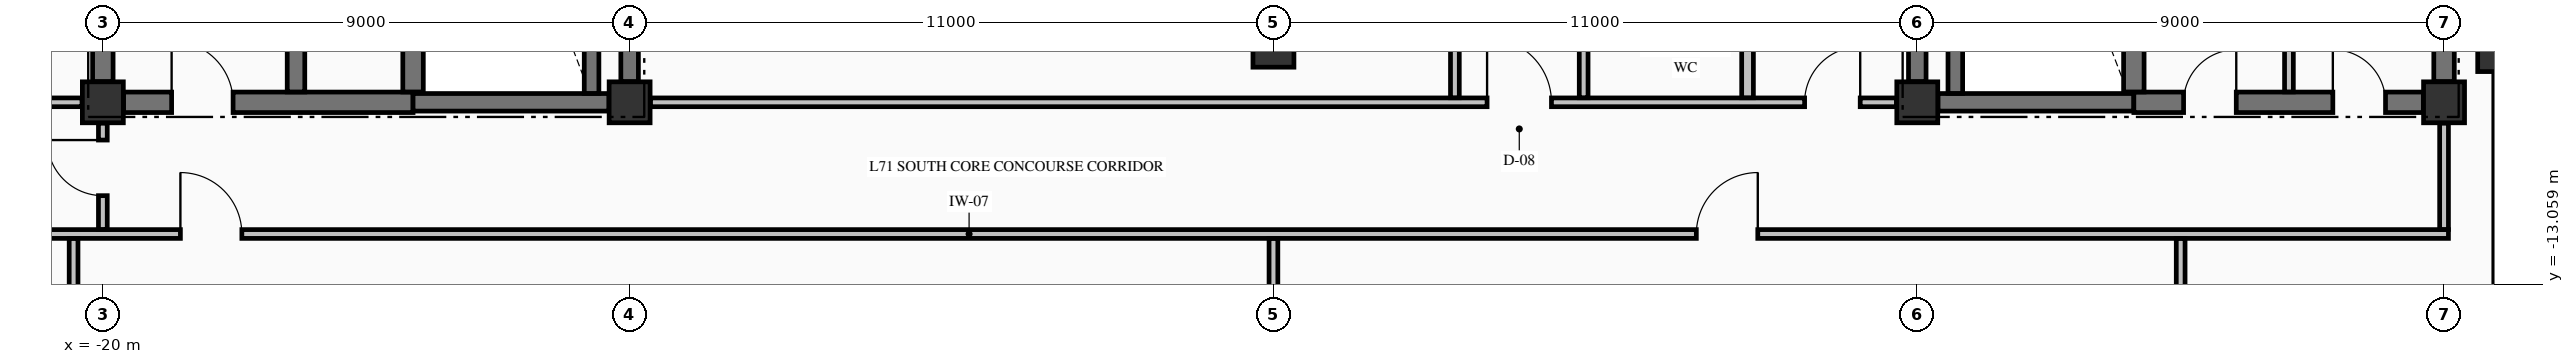
"""IFC4 building model, lengths in metres.
Left out: names, types, materials, properties, quantities, classifications, styles, units other than length and angle.
Written with IfcOpenShell. Run it as: python <this file> out.ifc"""

import sys

from ifc_helpers import new_model, si_unit, direction, frame, frame_2d, origin, origin_2d, place, context, subcontext, project, spatial, rectangle, extrude, element, fill, save


model = new_model("IFC4")
c1 = context("Model", 3, precision=1e-05, world=origin(), true_north=direction((0.0, 1.0)))
c2 = subcontext(c1, "Body", "Model", "MODEL_VIEW")
j1 = project(units=[si_unit("LENGTHUNIT", "METRE"), si_unit("PLANEANGLEUNIT", "RADIAN")], contexts=[c1])
p1 = place(None, origin())
s1 = spatial("IfcSite", under=j1, at=p1, CompositionType="ELEMENT")
p2 = place(p1, origin())
s2 = spatial("IfcBuilding", under=s1, at=p2, CompositionType="ELEMENT")
p3 = place(p2, frame((0.0, 0.0, 267.35)))
s3 = spatial("IfcBuildingStorey", under=s2, at=p3, CompositionType="ELEMENT", Elevation=267.35)
p4 = place(p3, frame((21.0, -9.0, -0.25), z_axis=(0.0, 0.0, 1.0), x_axis=(1.0, 0.0, 0.0)))
e1 = element("IfcColumn", 1, at=p4, inside=s3, PredefinedType="COLUMN", context=c2, shape_type="SweptSolid", body=[
    extrude(rectangle(XDim=0.85, YDim=0.85, at=origin_2d()), origin(), (0.0, 0.0, 1.0), 3.155),
])
for number, where, z_axis, x_axis in (
    (2, (-20.0, -9.95, -0.25), (0.0, 0.0, 1.0), (1.0, 0.0, 0.0)),
    (3, (-11.0, -9.95, -0.25), (0.0, 0.0, 1.0), (1.0, 0.0, 0.0)),
    (4, (11.0, -9.95, -0.25), (0.0, 0.0, 1.0), (1.0, 0.0, 0.0)),
    (5, (20.0, -9.95, -0.25), (0.0, 0.0, 1.0), (1.0, 0.0, 0.0)),
    (6, (0.0, -9.0, -0.25), (0.0, 0.0, 1.0), (1.0, 0.0, 0.0)),
):
    element("IfcColumn", number, at=place(p3, frame(where, z_axis=z_axis, x_axis=x_axis)), inside=s3, PredefinedType="COLUMN", context=c2, shape_type="SweptSolid", body=[
        extrude(rectangle(XDim=0.7, YDim=0.7, at=origin_2d()), origin(), (0.0, 0.0, 1.0), 3.155),
    ])
p5 = place(p3, frame((21.0, -17.545, 0.0), z_axis=(0.0, 0.0, 1.0), x_axis=(0.0, 1.0, 0.0)))
e7 = element("IfcWall", 7, at=p5, inside=s3, PredefinedType="STANDARD", context=c2, shape_type="SweptSolid", body=[
    extrude(rectangle(XDim=8.09, YDim=0.3, at=frame_2d((4.045, 0.0))), origin(), (0.0, 0.0, 1.0), 2.297),
])
p6 = place(p3, frame((-19.646, -9.95, 0.0), z_axis=(0.0, 0.0, 1.0), x_axis=(1.0, 0.0, 0.0)))
e8 = element("IfcWall", 8, at=p6, inside=s3, PredefinedType="SHEAR", context=c2, shape_type="SweptSolid", body=[
    extrude(rectangle(XDim=4.946, YDim=0.35, at=frame_2d((2.473, 0.0))), origin(), (0.0, 0.0, 1.0), 2.905),
])
p7 = place(p6, frame((0.821, 0.0, 0.0)))
e9 = element("IfcOpeningElement", 9, at=p7, cuts=e8, PredefinedType="OPENING", context=c2, shape_type="SweptSolid", body=[
    extrude(rectangle(XDim=1.05, YDim=2.15, at=frame_2d((0.525, 1.075))), frame((0.0, 0.185, 0.0), z_axis=(0.0, -1.0, 0.0), x_axis=(1.0, 0.0, 0.0)), (0.0, 0.0, 1.0), 0.37),
])
for number, where, z_axis, x_axis in (
    (10, (-14.7, -9.95, 0.0), (0.0, 0.0, 1.0), (1.0, 0.0, 0.0)),
    (11, (11.354, -9.95, 0.0), (0.0, 0.0, 1.0), (1.0, 0.0, 0.0)),
):
    element("IfcWall", number, at=place(p3, frame(where, z_axis=z_axis, x_axis=x_axis)), inside=s3, PredefinedType="SHEAR", context=c2, shape_type="SweptSolid", body=[
        extrude(rectangle(XDim=3.346, YDim=0.3, at=frame_2d((1.673, 0.0))), origin(), (0.0, 0.0, 1.0), 2.905),
    ])
p8 = place(p3, frame((14.7, -9.95, 0.0), z_axis=(0.0, 0.0, 1.0), x_axis=(1.0, 0.0, 0.0)))
e12 = element("IfcWall", 12, at=p8, inside=s3, PredefinedType="SHEAR", context=c2, shape_type="SweptSolid", body=[
    extrude(rectangle(XDim=4.946, YDim=0.35, at=frame_2d((2.473, 0.0))), origin(), (0.0, 0.0, 1.0), 2.905),
])
p9 = place(p8, frame((0.85, 0.0, 0.0)))
e13 = element("IfcOpeningElement", 13, at=p9, cuts=e12, PredefinedType="OPENING", context=c2, shape_type="SweptSolid", body=[
    extrude(rectangle(XDim=0.9, YDim=2.15, at=frame_2d((0.45, 1.075))), frame((0.0, 0.185, 0.0), z_axis=(0.0, -1.0, 0.0), x_axis=(1.0, 0.0, 0.0)), (0.0, 0.0, 1.0), 0.37),
])
p10 = place(p8, frame((3.4, 0.0, 0.0)))
e14 = element("IfcOpeningElement", 14, at=p10, cuts=e12, PredefinedType="OPENING", context=c2, shape_type="SweptSolid", body=[
    extrude(rectangle(XDim=0.9, YDim=2.15, at=frame_2d((0.45, 1.075))), frame((0.0, 0.185, 0.0), z_axis=(0.0, -1.0, 0.0), x_axis=(1.0, 0.0, 0.0)), (0.0, 0.0, 1.0), 0.37),
])
p11 = place(p3, frame((-25.835, -12.2, 0.0), z_axis=(0.0, 0.0, 1.0), x_axis=(1.0, 0.0, 0.0)))
e15 = element("IfcWall", 15, at=p11, inside=s3, PredefinedType="PARTITIONING", context=c2, shape_type="SweptSolid", body=[
    extrude(rectangle(XDim=45.91, YDim=0.15, at=frame_2d((22.955, 0.0))), origin(), (0.0, 0.0, 1.0), 2.905),
])
p12 = place(p11, frame((7.16, 0.0, 0.0)))
e16 = element("IfcOpeningElement", 16, at=p12, cuts=e15, PredefinedType="OPENING", context=c2, shape_type="SweptSolid", body=[
    extrude(rectangle(XDim=1.05, YDim=2.15, at=frame_2d((0.525, 1.075))), frame((0.0, 0.085, 0.0), z_axis=(0.0, -1.0, 0.0), x_axis=(1.0, 0.0, 0.0)), (0.0, 0.0, 1.0), 0.17),
])
p13 = place(p11, frame((33.06, 0.0, 0.0)))
e17 = element("IfcOpeningElement", 17, at=p13, cuts=e15, PredefinedType="OPENING", context=c2, shape_type="SweptSolid", body=[
    extrude(rectangle(XDim=1.05, YDim=2.15, at=frame_2d((0.525, 1.075))), frame((0.0, 0.085, 0.0), z_axis=(0.0, -1.0, 0.0), x_axis=(1.0, 0.0, 0.0)), (0.0, 0.0, 1.0), 0.17),
])
p14 = place(p3, frame((-25.835, -9.95, 0.0), z_axis=(0.0, 0.0, 1.0), x_axis=(1.0, 0.0, 0.0)))
e18 = element("IfcWall", 18, at=p14, inside=s3, PredefinedType="PARTITIONING", context=c2, shape_type="SweptSolid", body=[
    extrude(rectangle(XDim=5.479, YDim=0.15, at=frame_2d((2.74, 0.0))), origin(), (0.0, 0.0, 1.0), 2.905),
])
p15 = place(p14, frame((2.335, 0.0, 0.0)))
e19 = element("IfcOpeningElement", 19, at=p15, cuts=e18, PredefinedType="OPENING", context=c2, shape_type="SweptSolid", body=[
    extrude(rectangle(XDim=1.0, YDim=2.15, at=frame_2d((0.5, 1.075))), frame((0.0, 0.085, 0.0), z_axis=(0.0, -1.0, 0.0), x_axis=(1.0, 0.0, 0.0)), (0.0, 0.0, 1.0), 0.17),
])
p16 = place(p3, frame((-10.644, -9.95, 0.0), z_axis=(0.0, 0.0, 1.0), x_axis=(1.0, 0.0, 0.0)))
e20 = element("IfcWall", 20, at=p16, inside=s3, PredefinedType="PARTITIONING", context=c2, shape_type="SweptSolid", body=[
    extrude(rectangle(XDim=21.288, YDim=0.15, at=frame_2d((10.644, 0.0))), origin(), (0.0, 0.0, 1.0), 2.905),
])
p17 = place(p16, frame((14.294, 0.0, 0.0)))
e21 = element("IfcOpeningElement", 21, at=p17, cuts=e20, PredefinedType="OPENING", context=c2, shape_type="SweptSolid", body=[
    extrude(rectangle(XDim=1.1, YDim=2.15, at=frame_2d((0.55, 1.075))), frame((0.0, 0.085, 0.0), z_axis=(0.0, -1.0, 0.0), x_axis=(1.0, 0.0, 0.0)), (0.0, 0.0, 1.0), 0.17),
])
p18 = place(p16, frame((19.719, 0.0, 0.0)))
e22 = element("IfcOpeningElement", 22, at=p18, cuts=e20, PredefinedType="OPENING", context=c2, shape_type="SweptSolid", body=[
    extrude(rectangle(XDim=0.95, YDim=2.15, at=frame_2d((0.475, 1.075))), frame((0.0, 0.085, 0.0), z_axis=(0.0, -1.0, 0.0), x_axis=(1.0, 0.0, 0.0)), (0.0, 0.0, 1.0), 0.17),
])
p19 = place(p3, frame((-20.0, -9.596, 0.0), z_axis=(0.0, 0.0, 1.0), x_axis=(0.0, 1.0, 0.0)))
e23 = element("IfcWall", 23, at=p19, inside=s3, PredefinedType="SHEAR", context=c2, shape_type="SweptSolid", body=[
    extrude(rectangle(XDim=9.242, YDim=0.35, at=frame_2d((4.621, 0.0))), origin(), (0.0, 0.0, 1.0), 2.905),
])
p20 = place(p3, frame((-16.7, -9.773, 0.0), z_axis=(0.0, 0.0, 1.0), x_axis=(0.0, 1.0, 0.0)))
e24 = element("IfcWall", 24, at=p20, inside=s3, PredefinedType="SHEAR", context=c2, shape_type="SweptSolid", body=[
    extrude(rectangle(XDim=9.371, YDim=0.3, at=frame_2d((4.686, 0.0))), origin(), (0.0, 0.0, 1.0), 2.905),
])
p21 = place(p3, frame((-14.7, -9.773, 0.0), z_axis=(0.0, 0.0, 1.0), x_axis=(0.0, 1.0, 0.0)))
e25 = element("IfcWall", 25, at=p21, inside=s3, PredefinedType="SHEAR", context=c2, shape_type="SweptSolid", body=[
    extrude(rectangle(XDim=9.371, YDim=0.35, at=frame_2d((4.686, 0.0))), origin(), (0.0, 0.0, 1.0), 2.905),
])
p22 = place(p3, frame((-11.65, -9.798, 0.0), z_axis=(0.0, 0.0, 1.0), x_axis=(0.0, 1.0, 0.0)))
e26 = element("IfcWall", 26, at=p22, inside=s3, PredefinedType="SOLIDWALL", context=c2, shape_type="SweptSolid", body=[
    extrude(rectangle(XDim=9.396, YDim=0.25, at=frame_2d((4.698, 0.0))), origin(), (0.0, 0.0, 1.0), 2.905),
])
for number, where, z_axis, x_axis in (
    (27, (-11.0, -9.596, 0.0), (0.0, 0.0, 1.0), (0.0, 1.0, 0.0)),
    (28, (11.0, -9.596, 0.0), (0.0, 0.0, 1.0), (0.0, 1.0, 0.0)),
):
    element("IfcWall", number, at=place(p3, frame(where, z_axis=z_axis, x_axis=x_axis)), inside=s3, PredefinedType="SHEAR", context=c2, shape_type="SweptSolid", body=[
        extrude(rectangle(XDim=9.242, YDim=0.3, at=frame_2d((4.621, 0.0))), origin(), (0.0, 0.0, 1.0), 2.905),
    ])
p23 = place(p3, frame((11.65, -9.798, 0.0), z_axis=(0.0, 0.0, 1.0), x_axis=(0.0, 1.0, 0.0)))
e29 = element("IfcWall", 29, at=p23, inside=s3, PredefinedType="SOLIDWALL", context=c2, shape_type="SweptSolid", body=[
    extrude(rectangle(XDim=9.396, YDim=0.25, at=frame_2d((4.698, 0.0))), origin(), (0.0, 0.0, 1.0), 2.905),
])
p24 = place(p3, frame((14.7, -9.773, 0.0), z_axis=(0.0, 0.0, 1.0), x_axis=(0.0, 1.0, 0.0)))
e30 = element("IfcWall", 30, at=p24, inside=s3, PredefinedType="SHEAR", context=c2, shape_type="SweptSolid", body=[
    extrude(rectangle(XDim=9.371, YDim=0.35, at=frame_2d((4.686, 0.0))), origin(), (0.0, 0.0, 1.0), 2.905),
])
p25 = place(p3, frame((20.0, -9.596, 0.0), z_axis=(0.0, 0.0, 1.0), x_axis=(0.0, 1.0, 0.0)))
e31 = element("IfcWall", 31, at=p25, inside=s3, PredefinedType="SHEAR", context=c2, shape_type="SweptSolid", body=[
    extrude(rectangle(XDim=14.769, YDim=0.35, at=frame_2d((7.385, 0.0))), origin(), (0.0, 0.0, 1.0), 2.905),
])
p26 = place(p3, frame((-20.5, -17.569, 0.0), z_axis=(0.0, 0.0, 1.0), x_axis=(0.0, 1.0, 0.0)))
e32 = element("IfcWall", 32, at=p26, inside=s3, PredefinedType="PARTITIONING", context=c2, shape_type="SweptSolid", body=[
    extrude(rectangle(XDim=5.291, YDim=0.15, at=frame_2d((2.646, 0.0))), origin(), (0.0, 0.0, 1.0), 2.905),
])
p27 = place(p3, frame((-20.0, -12.122, 0.0), z_axis=(0.0, 0.0, 1.0), x_axis=(0.0, 1.0, 0.0)))
e33 = element("IfcWall", 33, at=p27, inside=s3, PredefinedType="PARTITIONING", context=c2, shape_type="SweptSolid", body=[
    extrude(rectangle(XDim=1.816, YDim=0.15, at=frame_2d((0.908, 0.0))), origin(), (0.0, 0.0, 1.0), 2.905),
])
p28 = place(p27, frame((0.577, 0.0, 0.0)))
e34 = element("IfcOpeningElement", 34, at=p28, cuts=e33, PredefinedType="OPENING", context=c2, shape_type="SweptSolid", body=[
    extrude(rectangle(XDim=0.95, YDim=2.15, at=frame_2d((0.475, 1.075))), frame((0.0, 0.085, 0.0), z_axis=(0.0, -1.0, 0.0), x_axis=(1.0, 0.0, 0.0)), (0.0, 0.0, 1.0), 0.17),
])
p29 = place(p3, frame((0.0, -23.069, 0.0), z_axis=(0.0, 0.0, 1.0), x_axis=(0.0, 1.0, 0.0)))
e35 = element("IfcWall", 35, at=p29, inside=s3, PredefinedType="PARTITIONING", context=c2, shape_type="SweptSolid", body=[
    extrude(rectangle(XDim=10.791, YDim=0.15, at=frame_2d((5.396, 0.0))), origin(), (0.0, 0.0, 1.0), 2.495),
])
p30 = place(p3, frame((3.1, -9.872, 0.0), z_axis=(0.0, 0.0, 1.0), x_axis=(0.0, 1.0, 0.0)))
e36 = element("IfcWall", 36, at=p30, inside=s3, PredefinedType="PARTITIONING", context=c2, shape_type="SweptSolid", body=[
    extrude(rectangle(XDim=9.544, YDim=0.15, at=frame_2d((4.772, 0.0))), origin(), (0.0, 0.0, 1.0), 2.905),
])
p31 = place(p3, frame((5.3, -9.872, 0.0), z_axis=(0.0, 0.0, 1.0), x_axis=(0.0, 1.0, 0.0)))
e37 = element("IfcWall", 37, at=p31, inside=s3, PredefinedType="PARTITIONING", context=c2, shape_type="SweptSolid", body=[
    extrude(rectangle(XDim=4.919, YDim=0.15, at=frame_2d((2.459, 0.0))), origin(), (0.0, 0.0, 1.0), 2.905),
])
p32 = place(p31, frame((1.997, 0.0, 0.0)))
e38 = element("IfcOpeningElement", 38, at=p32, cuts=e37, PredefinedType="OPENING", context=c2, shape_type="SweptSolid", body=[
    extrude(rectangle(XDim=0.95, YDim=2.15, at=frame_2d((0.475, 1.075))), frame((0.0, 0.085, 0.0), z_axis=(0.0, -1.0, 0.0), x_axis=(1.0, 0.0, 0.0)), (0.0, 0.0, 1.0), 0.17),
])
p33 = place(p3, frame((8.1, -9.872, 0.0), z_axis=(0.0, 0.0, 1.0), x_axis=(0.0, 1.0, 0.0)))
e39 = element("IfcWall", 39, at=p33, inside=s3, PredefinedType="PARTITIONING", context=c2, shape_type="SweptSolid", body=[
    extrude(rectangle(XDim=4.919, YDim=0.2, at=frame_2d((2.459, 0.0))), origin(), (0.0, 0.0, 1.0), 2.905),
])
p34 = place(p3, frame((15.5, -17.569, 0.0), z_axis=(0.0, 0.0, 1.0), x_axis=(0.0, 1.0, 0.0)))
e40 = element("IfcWall", 40, at=p34, inside=s3, PredefinedType="PARTITIONING", context=c2, shape_type="SweptSolid", body=[
    extrude(rectangle(XDim=5.291, YDim=0.15, at=frame_2d((2.646, 0.0))), origin(), (0.0, 0.0, 1.0), 2.905),
])
p35 = place(p3, frame((17.35, -9.772, 0.0), z_axis=(0.0, 0.0, 1.0), x_axis=(0.0, 1.0, 0.0)))
e41 = element("IfcWall", 41, at=p35, inside=s3, PredefinedType="PARTITIONING", context=c2, shape_type="SweptSolid", body=[
    extrude(rectangle(XDim=14.494, YDim=0.15, at=frame_2d((7.247, 0.0))), origin(), (0.0, 0.0, 1.0), 2.905),
])
p36 = place(p3, frame((20.0, -12.122, 0.0), z_axis=(0.0, 0.0, 1.0), x_axis=(0.0, 1.0, 0.0)))
e42 = element("IfcWall", 42, at=p36, inside=s3, PredefinedType="PARTITIONING", context=c2, shape_type="SweptSolid", body=[
    extrude(rectangle(XDim=1.816, YDim=0.15, at=frame_2d((0.908, 0.0))), origin(), (0.0, 0.0, 1.0), 2.495),
])
p37 = place(p7, origin())
e43 = element("IfcDoor", 43, at=p37, inside=s3, OperationType="SINGLE_SWING_LEFT", PredefinedType="DOOR", context=c2, shape_type="SweptSolid", body=[
    extrude(rectangle(XDim=1.05, YDim=2.15, at=frame_2d((0.525, 1.075))), frame((0.0, 0.025, 0.0), z_axis=(0.0, -1.0, 0.0), x_axis=(1.0, 0.0, 0.0)), (0.0, 0.0, 1.0), 0.05),
])
fill(e9, e43)
p38 = place(p9, origin())
e44 = element("IfcDoor", 44, at=p38, inside=s3, OperationType="SINGLE_SWING_RIGHT", PredefinedType="DOOR", context=c2, shape_type="SweptSolid", body=[
    extrude(rectangle(XDim=0.9, YDim=2.15, at=frame_2d((0.45, 1.075))), frame((0.0, 0.025, 0.0), z_axis=(0.0, -1.0, 0.0), x_axis=(1.0, 0.0, 0.0)), (0.0, 0.0, 1.0), 0.05),
])
fill(e13, e44)
p39 = place(p10, origin())
e45 = element("IfcDoor", 45, at=p39, inside=s3, OperationType="SINGLE_SWING_LEFT", PredefinedType="DOOR", context=c2, shape_type="SweptSolid", body=[
    extrude(rectangle(XDim=0.9, YDim=2.15, at=frame_2d((0.45, 1.075))), frame((0.0, 0.025, 0.0), z_axis=(0.0, -1.0, 0.0), x_axis=(1.0, 0.0, 0.0)), (0.0, 0.0, 1.0), 0.05),
])
fill(e14, e45)
p40 = place(p17, origin())
e46 = element("IfcDoor", 46, at=p40, inside=s3, OperationType="SINGLE_SWING_LEFT", PredefinedType="DOOR", context=c2, shape_type="SweptSolid", body=[
    extrude(rectangle(XDim=1.1, YDim=2.15, at=frame_2d((0.55, 1.075))), frame((0.0, 0.025, 0.0), z_axis=(0.0, -1.0, 0.0), x_axis=(1.0, 0.0, 0.0)), (0.0, 0.0, 1.0), 0.05),
])
fill(e21, e46)
p41 = place(p12, origin())
e47 = element("IfcDoor", 47, at=p41, inside=s3, OperationType="SINGLE_SWING_LEFT", PredefinedType="DOOR", context=c2, shape_type="SweptSolid", body=[
    extrude(rectangle(XDim=1.05, YDim=2.15, at=frame_2d((0.525, 1.075))), frame((0.0, 0.025, 0.0), z_axis=(0.0, -1.0, 0.0), x_axis=(1.0, 0.0, 0.0)), (0.0, 0.0, 1.0), 0.05),
])
fill(e16, e47)
p42 = place(p13, origin())
e48 = element("IfcDoor", 48, at=p42, inside=s3, OperationType="SINGLE_SWING_RIGHT", PredefinedType="DOOR", context=c2, shape_type="SweptSolid", body=[
    extrude(rectangle(XDim=1.05, YDim=2.15, at=frame_2d((0.525, 1.075))), frame((0.0, 0.025, 0.0), z_axis=(0.0, -1.0, 0.0), x_axis=(1.0, 0.0, 0.0)), (0.0, 0.0, 1.0), 0.05),
])
fill(e17, e48)
p43 = place(p18, origin())
e49 = element("IfcDoor", 49, at=p43, inside=s3, OperationType="SINGLE_SWING_RIGHT", PredefinedType="DOOR", context=c2, shape_type="SweptSolid", body=[
    extrude(rectangle(XDim=0.95, YDim=2.15, at=frame_2d((0.475, 1.075))), frame((0.0, 0.025, 0.0), z_axis=(0.0, -1.0, 0.0), x_axis=(1.0, 0.0, 0.0)), (0.0, 0.0, 1.0), 0.05),
])
fill(e22, e49)
p44 = place(p28, origin())
e50 = element("IfcDoor", 50, at=p44, inside=s3, OperationType="SINGLE_SWING_RIGHT", PredefinedType="DOOR", context=c2, shape_type="SweptSolid", body=[
    extrude(rectangle(XDim=0.95, YDim=2.15, at=frame_2d((0.475, 1.075))), frame((0.0, 0.025, 0.0), z_axis=(0.0, -1.0, 0.0), x_axis=(1.0, 0.0, 0.0)), (0.0, 0.0, 1.0), 0.05),
])
fill(e34, e50)
save(model, sys.argv[1])
